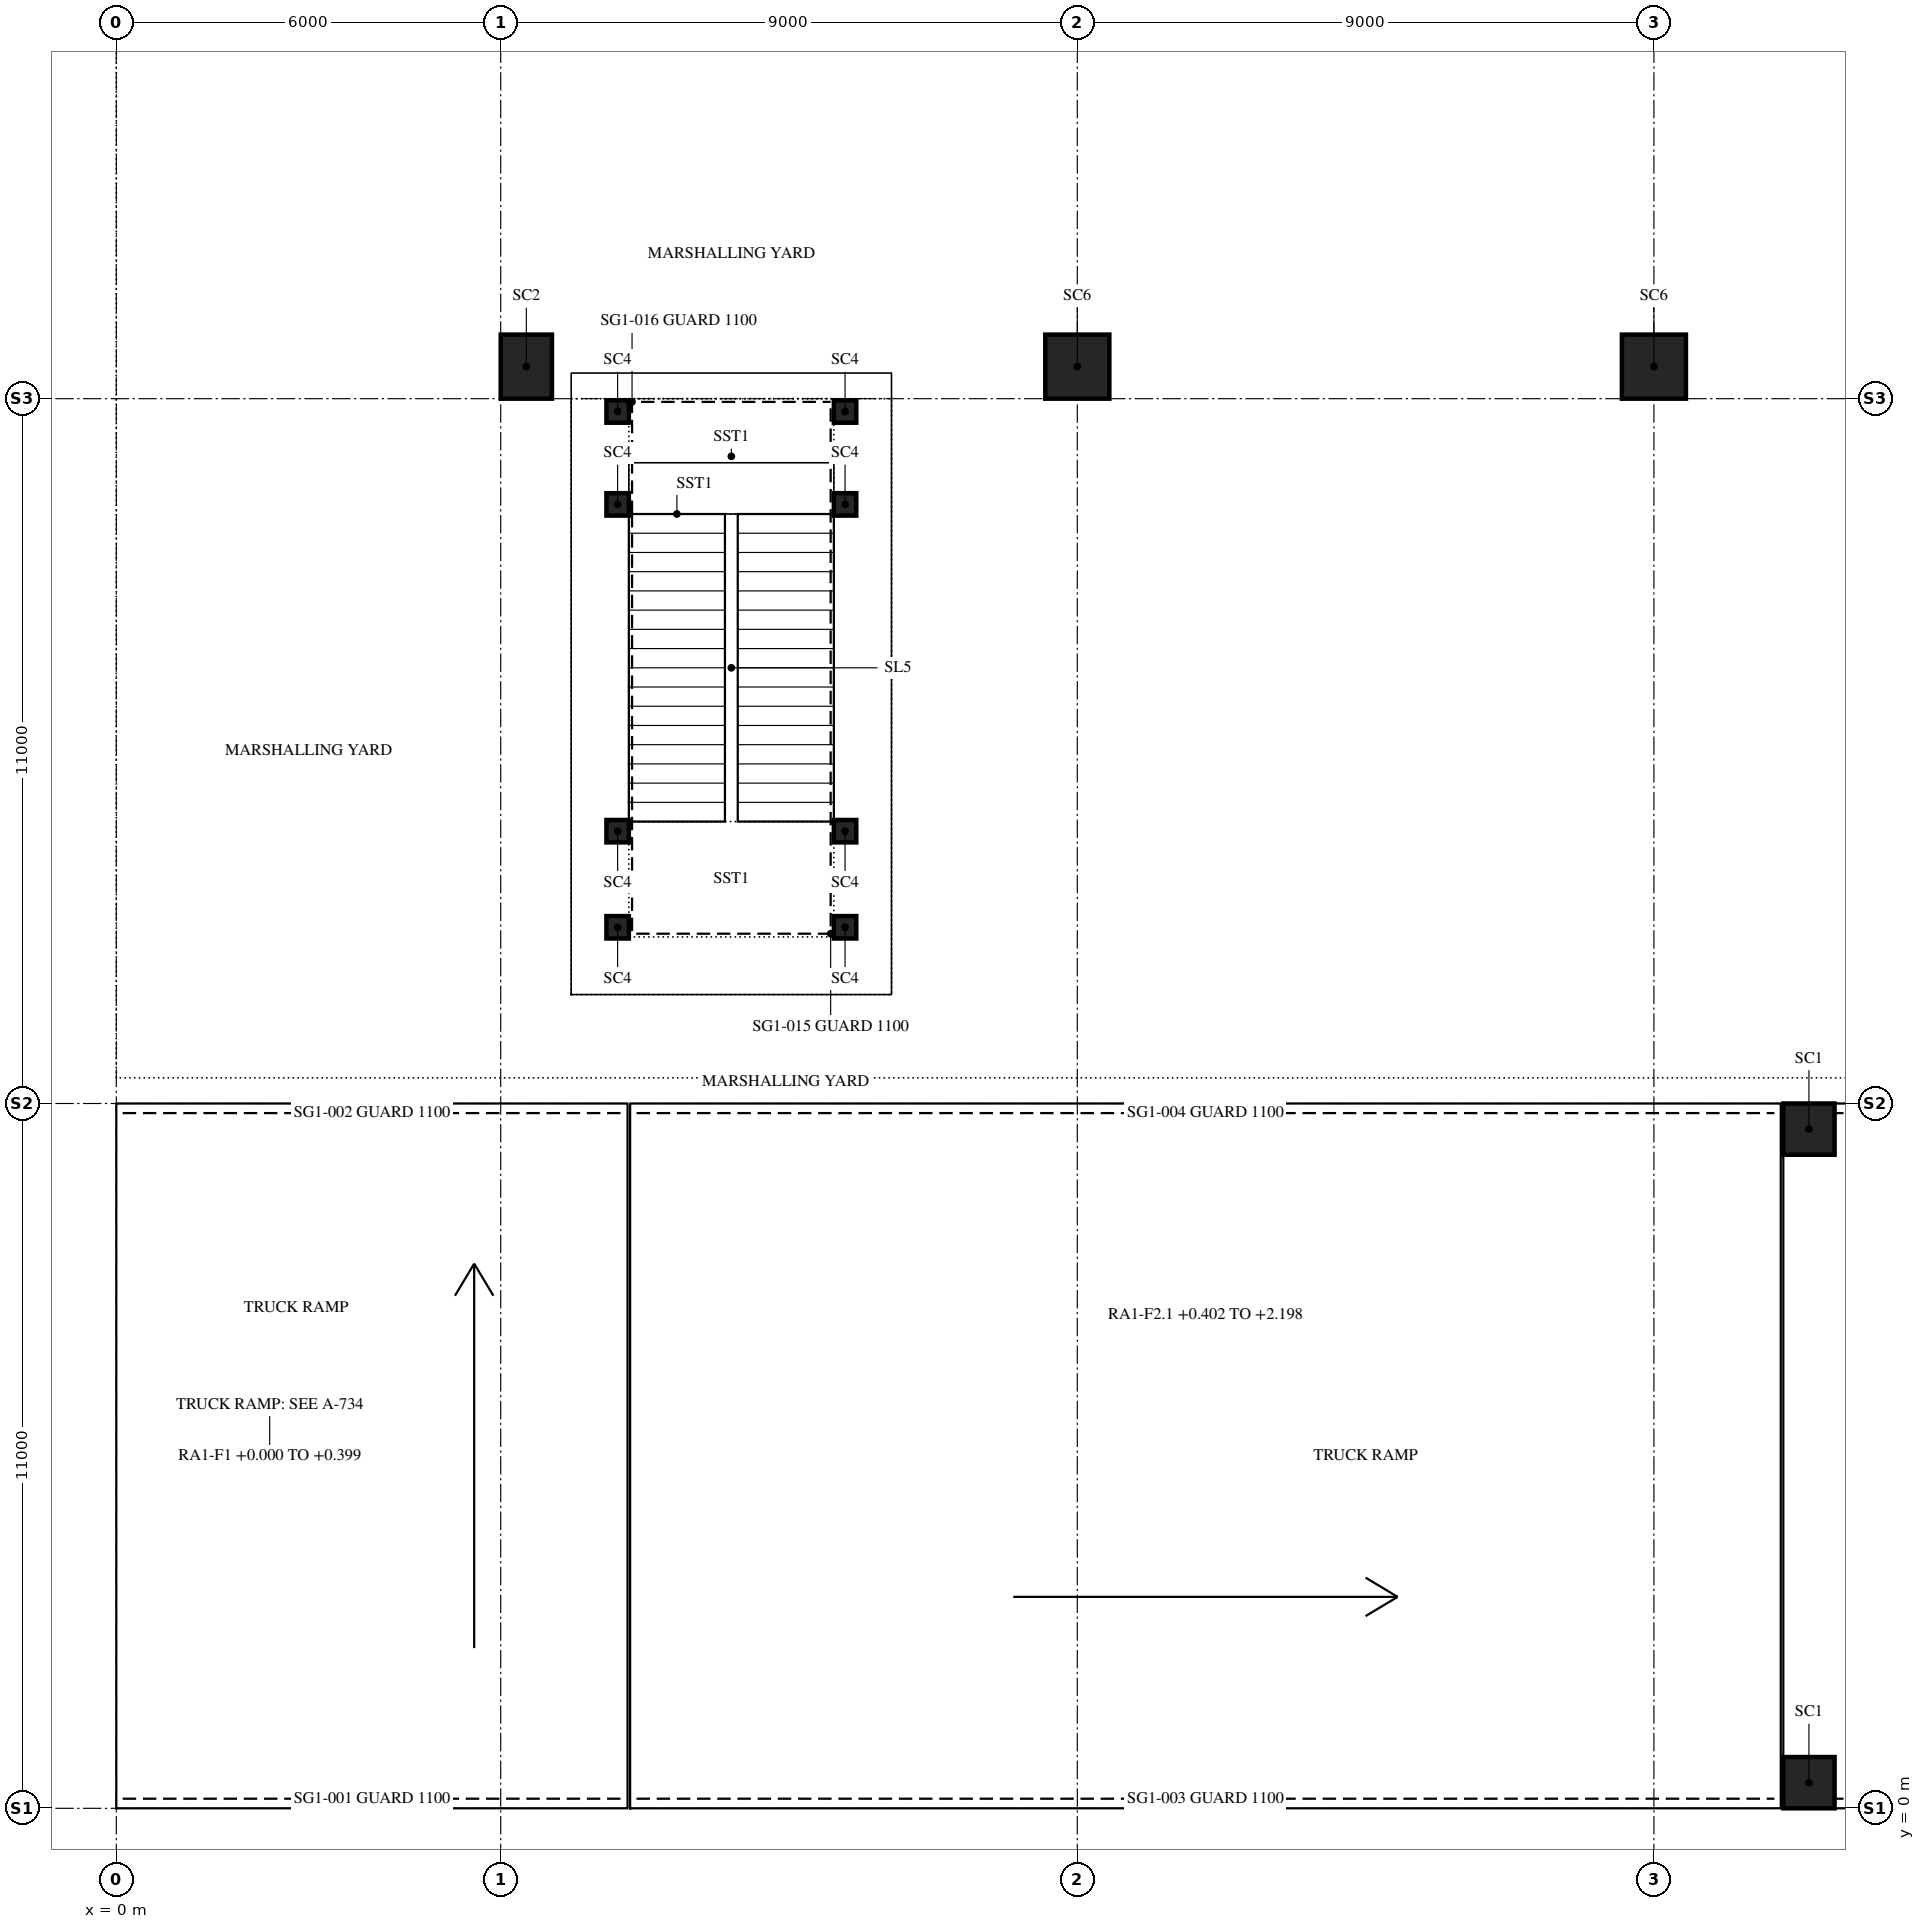
"""IFC4 building model, lengths in metres.
Left out: names, types, materials, properties, quantities, classifications, styles, units other than length and angle.
Written with IfcOpenShell. Run it as: python <this file> out.ifc"""

import sys

from ifc_helpers import new_model, si_unit, direction, frame, origin, origin_2d, place, context, subcontext, project, spatial, rectangle, extrude, element, save


model = new_model("IFC4")
c1 = context("Model", 3, precision=1e-05, world=origin(), true_north=direction((0.0, 1.0)))
c2 = subcontext(c1, "Body", "Model", "MODEL_VIEW")
j1 = project(units=[si_unit("LENGTHUNIT", "METRE"), si_unit("PLANEANGLEUNIT", "RADIAN")], contexts=[c1])
p1 = place(None, origin())
s1 = spatial("IfcSite", under=j1, at=p1, CompositionType="ELEMENT")
p2 = place(p1, origin())
s2 = spatial("IfcBuilding", under=s1, at=p2, CompositionType="ELEMENT")
p3 = place(p2, origin())
s3 = spatial("IfcBuildingStorey", under=s2, at=p3, CompositionType="ELEMENT", Elevation=0.0)
for number, where, z_axis, x_axis in (
    (1, (26.42, 0.4, -0.3), (0.0, 0.0, 1.0), (1.0, 0.0, 0.0)),
    (2, (26.42, 10.6, -0.3), (0.0, 0.0, 1.0), (1.0, 0.0, 0.0)),
):
    element("IfcColumn", number, at=place(p3, frame(where, z_axis=z_axis, x_axis=x_axis)), inside=s3, PredefinedType="COLUMN", context=c2, shape_type="SweptSolid", body=[
        extrude(rectangle(XDim=0.8, YDim=0.8, at=origin_2d()), origin(), (0.0, 0.0, 1.0), 1.03),
    ])
p4 = place(p3, frame((6.4, 22.5, -0.3), z_axis=(0.0, 0.0, 1.0), x_axis=(1.0, 0.0, 0.0)))
e3 = element("IfcColumn", 3, at=p4, inside=s3, PredefinedType="COLUMN", context=c2, shape_type="SweptSolid", body=[
    extrude(rectangle(XDim=0.8, YDim=1.0, at=origin_2d()), origin(), (0.0, 0.0, 1.0), 5.3),
])
for number, where, z_axis, x_axis in (
    (4, (15.0, 22.5, -0.3), (0.0, 0.0, 1.0), (1.0, 0.0, 0.0)),
    (5, (24.0, 22.5, -0.3), (0.0, 0.0, 1.0), (1.0, 0.0, 0.0)),
):
    element("IfcColumn", number, at=place(p3, frame(where, z_axis=z_axis, x_axis=x_axis)), inside=s3, PredefinedType="COLUMN", context=c2, shape_type="SweptSolid", body=[
        extrude(rectangle(XDim=1.0, YDim=1.0, at=origin_2d()), origin(), (0.0, 0.0, 1.0), 5.3),
    ])
for number, where, z_axis, x_axis in (
    (6, (7.825, 21.8, -0.3), (0.0, 0.0, 1.0), (1.0, 0.0, 0.0)),
    (7, (7.825, 20.35, -0.3), (0.0, 0.0, 1.0), (1.0, 0.0, 0.0)),
    (8, (7.825, 15.25, -0.3), (0.0, 0.0, 1.0), (1.0, 0.0, 0.0)),
    (9, (7.825, 13.75, -0.3), (0.0, 0.0, 1.0), (1.0, 0.0, 0.0)),
    (10, (11.375, 21.8, -0.3), (0.0, 0.0, 1.0), (1.0, 0.0, 0.0)),
    (11, (11.375, 20.35, -0.3), (0.0, 0.0, 1.0), (1.0, 0.0, 0.0)),
    (12, (11.375, 15.25, -0.3), (0.0, 0.0, 1.0), (1.0, 0.0, 0.0)),
    (13, (11.375, 13.75, -0.3), (0.0, 0.0, 1.0), (1.0, 0.0, 0.0)),
):
    element("IfcColumn", number, at=place(p3, frame(where, z_axis=z_axis, x_axis=x_axis)), inside=s3, PredefinedType="COLUMN", context=c2, shape_type="SweptSolid", body=[
        extrude(rectangle(XDim=0.35, YDim=0.35, at=origin_2d()), origin(), (0.0, 0.0, 1.0), 5.3),
    ])
save(model, sys.argv[1])
